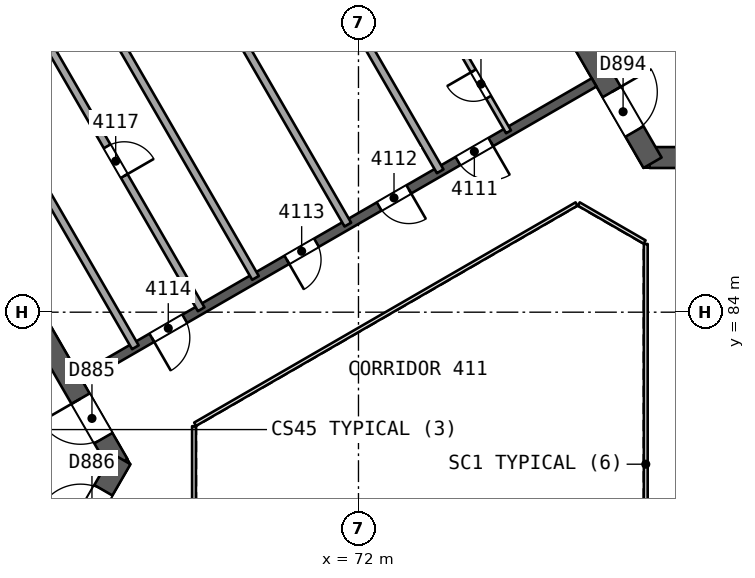
"""IFC4 building model, lengths in metres.
Left out: names, types, materials, properties, quantities, classifications, styles, units other than length and angle.
Written with IfcOpenShell. Run it as: python <this file> out.ifc"""

import sys

from ifc_helpers import new_model, si_unit, direction, frame, frame_2d, origin, place, context, subcontext, project, spatial, rectangle, extrude, element, fill, save


model = new_model("IFC4")
c1 = context("Model", 3, precision=1e-05, world=origin(), true_north=direction((0.0, 1.0)))
c2 = subcontext(c1, "Body", "Model", "MODEL_VIEW")
j1 = project(units=[si_unit("LENGTHUNIT", "METRE"), si_unit("PLANEANGLEUNIT", "RADIAN")], contexts=[c1])
p1 = place(None, origin())
s1 = spatial("IfcSite", under=j1, at=p1, CompositionType="ELEMENT")
p2 = place(p1, origin())
s2 = spatial("IfcBuilding", under=s1, at=p2, CompositionType="ELEMENT")
p3 = place(p2, frame((0.0, 0.0, 171.1)))
s3 = spatial("IfcBuildingStorey", under=s2, at=p3, CompositionType="ELEMENT", Elevation=171.1)
p4 = place(p3, frame((65.682, 80.0, 0.0), z_axis=(0.0, 0.0, 1.0), x_axis=(-0.500000202252, 0.866025287014, 0.0)))
e1 = element("IfcWall", 1, at=p4, inside=s3, PredefinedType="SHEAR", context=c2, shape_type="SweptSolid", body=[
    extrude(rectangle(XDim=10.221, YDim=0.55, at=frame_2d((5.111, 0.0))), origin(), (0.0, 0.0, 1.0), 3.7),
])
p5 = place(p4, frame((0.791, 0.0, 0.0)))
e2 = element("IfcOpeningElement", 2, at=p5, cuts=e1, PredefinedType="OPENING", context=c2, shape_type="SweptSolid", body=[
    extrude(rectangle(XDim=1.2, YDim=2.1, at=frame_2d((0.6, 1.05))), frame((0.0, 0.286, 0.0), z_axis=(0.0, -1.0, 0.0), x_axis=(1.0, 0.0, 0.0)), (0.0, 0.0, 1.0), 0.571),
])
p6 = place(p3, frame((60.709, 71.386, 0.0), z_axis=(0.0, 0.0, 1.0), x_axis=(0.500015938302, 0.866016201606, 0.0)))
e3 = element("IfcWall", 3, at=p6, inside=s3, PredefinedType="SHEAR", context=c2, shape_type="SweptSolid", body=[
    extrude(rectangle(XDim=10.105, YDim=0.55, at=frame_2d((5.053, 0.0))), origin(), (0.0, 0.0, 1.0), 3.7),
])
p7 = place(p6, frame((7.955, 0.0, 0.0)))
e4 = element("IfcOpeningElement", 4, at=p7, cuts=e3, PredefinedType="OPENING", context=c2, shape_type="SweptSolid", body=[
    extrude(rectangle(XDim=1.2, YDim=2.1, at=frame_2d((0.6, 1.05))), frame((0.0, 0.286, 0.0), z_axis=(0.0, -1.0, 0.0), x_axis=(1.0, 0.0, 0.0)), (0.0, 0.0, 1.0), 0.571),
])
p8 = place(p3, frame((79.659, 88.069, 0.0), z_axis=(0.0, 0.0, 1.0), x_axis=(1.0, 0.0, 0.0)))
e5 = element("IfcWall", 5, at=p8, inside=s3, PredefinedType="SHEAR", context=c2, shape_type="SweptSolid", body=[
    extrude(rectangle(XDim=10.221, YDim=0.55, at=frame_2d((5.111, 0.0))), origin(), (0.0, 0.0, 1.0), 3.7),
])
p9 = place(p8, frame((0.791, 0.0, 0.0)))
e6 = element("IfcOpeningElement", 6, at=p9, cuts=e5, PredefinedType="OPENING", context=c2, shape_type="SweptSolid", body=[
    extrude(rectangle(XDim=1.2, YDim=2.1, at=frame_2d((0.6, 1.05))), frame((0.0, 0.286, 0.0), z_axis=(0.0, -1.0, 0.0), x_axis=(1.0, 0.0, 0.0)), (0.0, 0.0, 1.0), 0.571),
])
p10 = place(p3, frame((74.686, 96.683, 0.0), z_axis=(0.0, 0.0, 1.0), x_axis=(0.499997818338, -0.866026663364, 0.0)))
e7 = element("IfcWall", 7, at=p10, inside=s3, PredefinedType="SHEAR", context=c2, shape_type="SweptSolid", body=[
    extrude(rectangle(XDim=10.105, YDim=0.55, at=frame_2d((5.052, 0.0))), origin(), (0.0, 0.0, 1.0), 3.7),
])
p11 = place(p10, frame((7.955, 0.0, 0.0)))
e8 = element("IfcOpeningElement", 8, at=p11, cuts=e7, PredefinedType="OPENING", context=c2, shape_type="SweptSolid", body=[
    extrude(rectangle(XDim=1.2, YDim=2.1, at=frame_2d((0.6, 1.05))), frame((0.0, 0.286, 0.0), z_axis=(0.0, -1.0, 0.0), x_axis=(1.0, 0.0, 0.0)), (0.0, 0.0, 1.0), 0.571),
])
p12 = place(p3, frame((78.2, 90.046, 0.0), z_axis=(0.0, 0.0, 1.0), x_axis=(-0.866026492143, -0.499998114903, 0.0)))
e9 = element("IfcWall", 9, at=p12, inside=s3, PredefinedType="SHEAR", context=c2, shape_type="SweptSolid", body=[
    extrude(rectangle(XDim=15.588, YDim=0.25, at=frame_2d((7.794, 0.0))), origin(), (0.0, 0.0, 1.0), 3.25),
])
p13 = place(p12, frame((3.138, 0.0, 0.0)))
e10 = element("IfcOpeningElement", 10, at=p13, cuts=e9, PredefinedType="OPENING", context=c2, shape_type="SweptSolid", body=[
    extrude(rectangle(XDim=1.0, YDim=2.1, at=frame_2d((0.5, 1.05))), frame((0.0, 0.135, 0.0), z_axis=(0.0, -1.0, 0.0), x_axis=(1.0, 0.0, 0.0)), (0.0, 0.0, 1.0), 0.271),
])
p14 = place(p12, frame((5.629, 0.0, 0.0)))
e11 = element("IfcOpeningElement", 11, at=p14, cuts=e9, PredefinedType="OPENING", context=c2, shape_type="SweptSolid", body=[
    extrude(rectangle(XDim=0.9, YDim=2.1, at=frame_2d((0.45, 1.05))), frame((0.0, 0.135, 0.0), z_axis=(0.0, -1.0, 0.0), x_axis=(1.0, 0.0, 0.0)), (0.0, 0.0, 1.0), 0.271),
])
p15 = place(p12, frame((8.435, 0.0, 0.0)))
e12 = element("IfcOpeningElement", 12, at=p15, cuts=e9, PredefinedType="OPENING", context=c2, shape_type="SweptSolid", body=[
    extrude(rectangle(XDim=0.9, YDim=2.1, at=frame_2d((0.45, 1.05))), frame((0.0, 0.135, 0.0), z_axis=(0.0, -1.0, 0.0), x_axis=(1.0, 0.0, 0.0)), (0.0, 0.0, 1.0), 0.271),
])
p16 = place(p12, frame((12.438, 0.0, 0.0)))
e13 = element("IfcOpeningElement", 13, at=p16, cuts=e9, PredefinedType="OPENING", context=c2, shape_type="SweptSolid", body=[
    extrude(rectangle(XDim=1.0, YDim=2.1, at=frame_2d((0.5, 1.05))), frame((0.0, 0.135, 0.0), z_axis=(0.0, -1.0, 0.0), x_axis=(1.0, 0.0, 0.0)), (0.0, 0.0, 1.0), 0.271),
])
p17 = place(p3, frame((75.948, 88.746, 0.0), z_axis=(0.0, 0.0, 1.0), x_axis=(-0.499987231761, 0.866032775405, 0.0)))
e14 = element("IfcWall", 14, at=p17, inside=s3, PredefinedType="PARTITIONING", context=c2, shape_type="SweptSolid", body=[
    extrude(rectangle(XDim=2.9, YDim=0.15, at=frame_2d((1.45, 0.0))), origin(), (0.0, 0.0, 1.0), 3.25),
])
p18 = place(p17, frame((1.05, 0.0, 0.0)))
e15 = element("IfcOpeningElement", 15, at=p18, cuts=e14, PredefinedType="OPENING", context=c2, shape_type="SweptSolid", body=[
    extrude(rectangle(XDim=0.8, YDim=2.1, at=frame_2d((0.4, 1.05))), frame((0.0, 0.085, 0.0), z_axis=(0.0, -1.0, 0.0), x_axis=(1.0, 0.0, 0.0)), (0.0, 0.0, 1.0), 0.171),
])
for number, where, z_axis, x_axis in (
    (16, (68.449, 97.582, 0.0), (0.0, 0.0, 1.0), (0.5, -0.866, 0.0)),
    (17, (66.019, 96.179, 0.0), (0.0, 0.0, 1.0), (0.5, -0.866, 0.0)),
    (18, (63.589, 94.776, 0.0), (0.0, 0.0, 1.0), (0.5, -0.866, 0.0)),
):
    element("IfcWall", number, at=place(p3, frame(where, z_axis=z_axis, x_axis=x_axis)), inside=s3, PredefinedType="PARTITIONING", context=c2, shape_type="SweptSolid", body=[
        extrude(rectangle(XDim=11.402, YDim=0.2, at=frame_2d((5.701, 0.0))), origin(), (0.0, 0.0, 1.0), 3.25),
    ])
p19 = place(p3, frame((66.129, 83.077, 0.0), z_axis=(0.0, 0.0, 1.0), x_axis=(-0.5000018851, 0.866024315419, 0.0)))
e19 = element("IfcWall", 19, at=p19, inside=s3, PredefinedType="PARTITIONING", context=c2, shape_type="SweptSolid", body=[
    extrude(rectangle(XDim=9.0, YDim=0.2, at=frame_2d((4.5, 0.0))), origin(), (0.0, 0.0, 1.0), 3.25),
])
p20 = place(p3, frame((63.361, 91.871, 0.0), z_axis=(0.0, 0.0, 1.0), x_axis=(0.5000018851, -0.866024315419, 0.0)))
e20 = element("IfcWall", 20, at=p20, inside=s3, PredefinedType="PARTITIONING", context=c2, shape_type="SweptSolid", body=[
    extrude(rectangle(XDim=9.0, YDim=0.2, at=frame_2d((4.5, 0.0))), origin(), (0.0, 0.0, 1.0), 3.25),
])
p21 = place(p20, frame((4.05, 0.0, 0.0)))
e21 = element("IfcOpeningElement", 21, at=p21, cuts=e20, PredefinedType="OPENING", context=c2, shape_type="SweptSolid", body=[
    extrude(rectangle(XDim=0.9, YDim=2.1, at=frame_2d((0.45, 1.05))), frame((0.0, 0.11, 0.0), z_axis=(0.0, -1.0, 0.0), x_axis=(1.0, 0.0, 0.0)), (0.0, 0.0, 1.0), 0.221),
])
p22 = place(p3, frame((42.45, 82.744, 0.0), z_axis=(0.0, 0.0, 1.0), x_axis=(0.866024128163, 0.500002209434, 0.0)))
e22 = element("IfcWall", 22, at=p22, inside=s3, PredefinedType="SOLIDWALL", context=c2, shape_type="SweptSolid", body=[
    extrude(rectangle(XDim=53.635, YDim=0.3, at=frame_2d((26.817, 0.0))), origin(), (0.0, 0.0, 1.0), 3.25),
])
p23 = place(p22, frame((20.473, 0.0, 0.0)))
e23 = element("IfcOpeningElement", 23, at=p23, cuts=e22, PredefinedType="OPENING", context=c2, shape_type="SweptSolid", body=[
    extrude(rectangle(XDim=2.4, YDim=2.4, at=frame_2d((1.2, 1.2))), frame((0.0, 0.161, 0.0), z_axis=(0.0, -1.0, 0.0), x_axis=(1.0, 0.0, 0.0)), (0.0, 0.0, 1.0), 0.321),
])
p24 = place(p22, frame((9.514, 0.0, 0.0)))
e24 = element("IfcOpeningElement", 24, at=p24, cuts=e22, PredefinedType="OPENING", context=c2, shape_type="SweptSolid", body=[
    extrude(rectangle(XDim=2.4, YDim=2.4, at=frame_2d((1.2, 1.2))), frame((0.0, 0.161, 0.0), z_axis=(0.0, -1.0, 0.0), x_axis=(1.0, 0.0, 0.0)), (0.0, 0.0, 1.0), 0.321),
])
p25 = place(p22, frame((40.628, 0.0, 0.0)))
e25 = element("IfcOpeningElement", 25, at=p25, cuts=e22, PredefinedType="OPENING", context=c2, shape_type="SweptSolid", body=[
    extrude(rectangle(XDim=2.4, YDim=2.4, at=frame_2d((1.2, 1.2))), frame((0.0, 0.161, 0.0), z_axis=(0.0, -1.0, 0.0), x_axis=(1.0, 0.0, 0.0)), (0.0, 0.0, 1.0), 0.321),
])
p26 = place(p22, frame((27.632, 0.0, 0.9)))
e26 = element("IfcOpeningElement", 26, at=p26, cuts=e22, PredefinedType="OPENING", context=c2, shape_type="SweptSolid", body=[
    extrude(rectangle(XDim=1.8, YDim=1.5, at=frame_2d((0.9, 0.75))), frame((0.0, 0.161, 0.0), z_axis=(0.0, -1.0, 0.0), x_axis=(1.0, 0.0, 0.0)), (0.0, 0.0, 1.0), 0.321),
])
p27 = place(p22, frame((24.826, 0.0, 0.9)))
e27 = element("IfcOpeningElement", 27, at=p27, cuts=e22, PredefinedType="OPENING", context=c2, shape_type="SweptSolid", body=[
    extrude(rectangle(XDim=1.8, YDim=1.5, at=frame_2d((0.9, 0.75))), frame((0.0, 0.161, 0.0), z_axis=(0.0, -1.0, 0.0), x_axis=(1.0, 0.0, 0.0)), (0.0, 0.0, 1.0), 0.321),
])
p28 = place(p3, frame((86.77, 89.486, 0.0), z_axis=(0.0, 0.0, 1.0), x_axis=(-0.86601811187, 0.500012629753, 0.0)))
e28 = element("IfcWall", 28, at=p28, inside=s3, PredefinedType="SOLIDWALL", context=c2, shape_type="SweptSolid", body=[
    extrude(rectangle(XDim=10.9, YDim=0.2, at=frame_2d((5.45, 0.0))), origin(), (0.0, 0.0, 1.0), 3.25),
])
p29 = place(p28, frame((0.575, 0.0, 0.0)))
e29 = element("IfcOpeningElement", 29, at=p29, cuts=e28, PredefinedType="OPENING", context=c2, shape_type="SweptSolid", body=[
    extrude(rectangle(XDim=1.1, YDim=2.1, at=frame_2d((0.55, 1.05))), frame((0.0, 0.11, 0.0), z_axis=(0.0, -1.0, 0.0), x_axis=(1.0, 0.0, 0.0)), (0.0, 0.0, 1.0), 0.221),
])
p30 = place(p28, frame((2.825, 0.0, 0.0)))
e30 = element("IfcOpeningElement", 30, at=p30, cuts=e28, PredefinedType="OPENING", context=c2, shape_type="SweptSolid", body=[
    extrude(rectangle(XDim=1.1, YDim=2.1, at=frame_2d((0.55, 1.05))), frame((0.0, 0.11, 0.0), z_axis=(0.0, -1.0, 0.0), x_axis=(1.0, 0.0, 0.0)), (0.0, 0.0, 1.0), 0.221),
])
p31 = place(p28, frame((5.075, 0.0, 0.0)))
e31 = element("IfcOpeningElement", 31, at=p31, cuts=e28, PredefinedType="OPENING", context=c2, shape_type="SweptSolid", body=[
    extrude(rectangle(XDim=1.1, YDim=2.1, at=frame_2d((0.55, 1.05))), frame((0.0, 0.11, 0.0), z_axis=(0.0, -1.0, 0.0), x_axis=(1.0, 0.0, 0.0)), (0.0, 0.0, 1.0), 0.221),
])
p32 = place(p28, frame((7.325, 0.0, 0.0)))
e32 = element("IfcOpeningElement", 32, at=p32, cuts=e28, PredefinedType="OPENING", context=c2, shape_type="SweptSolid", body=[
    extrude(rectangle(XDim=1.1, YDim=2.1, at=frame_2d((0.55, 1.05))), frame((0.0, 0.11, 0.0), z_axis=(0.0, -1.0, 0.0), x_axis=(1.0, 0.0, 0.0)), (0.0, 0.0, 1.0), 0.221),
])
p33 = place(p3, frame((89.33, 90.872, 0.0), z_axis=(0.0, 0.0, 1.0), x_axis=(-0.866027589512, 0.49999621419, 0.0)))
e33 = element("IfcWall", 33, at=p33, inside=s3, PredefinedType="SOLIDWALL", context=c2, shape_type="SweptSolid", body=[
    extrude(rectangle(XDim=10.524, YDim=0.2, at=frame_2d((5.262, 0.0))), origin(), (0.0, 0.0, 1.0), 3.25),
])
p34 = place(p33, frame((0.312, 0.0, 0.0)))
e34 = element("IfcOpeningElement", 34, at=p34, cuts=e33, PredefinedType="OPENING", context=c2, shape_type="SweptSolid", body=[
    extrude(rectangle(XDim=0.9, YDim=2.1, at=frame_2d((0.45, 1.05))), frame((0.0, 0.11, 0.0), z_axis=(0.0, -1.0, 0.0), x_axis=(1.0, 0.0, 0.0)), (0.0, 0.0, 1.0), 0.221),
])
p35 = place(p3, frame((79.56, 74.206, 0.0), z_axis=(0.0, 0.0, 1.0), x_axis=(0.0, 1.0, 0.0)))
e35 = element("IfcWall", 35, at=p35, inside=s3, PredefinedType="PARTITIONING", context=c2, shape_type="SweptSolid", body=[
    extrude(rectangle(XDim=11.588, YDim=0.1, at=frame_2d((5.794, 0.0))), origin(), (0.0, 0.0, 1.0), 3.25),
])
p36 = place(p3, frame((79.53, 85.846, 0.0), z_axis=(0.0, 0.0, 1.0), x_axis=(-0.866041268327, 0.499972520799, 0.0)))
e36 = element("IfcWall", 36, at=p36, inside=s3, PredefinedType="PARTITIONING", context=c2, shape_type="SweptSolid", body=[
    extrude(rectangle(XDim=2.0, YDim=0.1, at=frame_2d((1.0, 0.0))), origin(), (0.0, 0.0, 1.0), 3.25),
])
p37 = place(p3, frame((77.738, 86.846, 0.0), z_axis=(0.0, 0.0, 1.0), x_axis=(-0.866026658274, -0.499997827154, 0.0)))
e37 = element("IfcWall", 37, at=p37, inside=s3, PredefinedType="PARTITIONING", context=c2, shape_type="SweptSolid", body=[
    extrude(rectangle(XDim=11.588, YDim=0.1, at=frame_2d((5.794, 0.0))), origin(), (0.0, 0.0, 1.0), 3.25),
])
p38 = place(p3, frame((67.672, 81.0, 0.0), z_axis=(0.0, 0.0, 1.0), x_axis=(0.0, -1.0, 0.0)))
e38 = element("IfcWall", 38, at=p38, inside=s3, PredefinedType="PARTITIONING", context=c2, shape_type="SweptSolid", body=[
    extrude(rectangle(XDim=2.0, YDim=0.1, at=frame_2d((1.0, 0.0))), origin(), (0.0, 0.0, 1.0), 3.25),
])
p39 = place(p18, origin())
e39 = element("IfcDoor", 39, at=p39, inside=s3, OperationType="SINGLE_SWING_RIGHT", PredefinedType="NOTDEFINED", context=c2, shape_type="SweptSolid", body=[
    extrude(rectangle(XDim=0.8, YDim=2.1, at=frame_2d((0.4, 1.05))), frame((0.0, 0.025, 0.0), z_axis=(0.0, -1.0, 0.0), x_axis=(1.0, 0.0, 0.0)), (0.0, 0.0, 1.0), 0.05),
])
fill(e15, e39)
p40 = place(p13, origin())
e40 = element("IfcDoor", 40, at=p40, inside=s3, OperationType="SINGLE_SWING_LEFT", PredefinedType="NOTDEFINED", context=c2, shape_type="SweptSolid", body=[
    extrude(rectangle(XDim=1.0, YDim=2.1, at=frame_2d((0.5, 1.05))), frame((0.0, 0.025, 0.0), z_axis=(0.0, -1.0, 0.0), x_axis=(1.0, 0.0, 0.0)), (0.0, 0.0, 1.0), 0.05),
])
fill(e10, e40)
p41 = place(p14, origin())
e41 = element("IfcDoor", 41, at=p41, inside=s3, OperationType="SINGLE_SWING_LEFT", PredefinedType="NOTDEFINED", context=c2, shape_type="SweptSolid", body=[
    extrude(rectangle(XDim=0.9, YDim=2.1, at=frame_2d((0.45, 1.05))), frame((0.0, 0.025, 0.0), z_axis=(0.0, -1.0, 0.0), x_axis=(1.0, 0.0, 0.0)), (0.0, 0.0, 1.0), 0.05),
])
fill(e11, e41)
p42 = place(p15, origin())
e42 = element("IfcDoor", 42, at=p42, inside=s3, OperationType="SINGLE_SWING_RIGHT", PredefinedType="NOTDEFINED", context=c2, shape_type="SweptSolid", body=[
    extrude(rectangle(XDim=0.9, YDim=2.1, at=frame_2d((0.45, 1.05))), frame((0.0, 0.025, 0.0), z_axis=(0.0, -1.0, 0.0), x_axis=(1.0, 0.0, 0.0)), (0.0, 0.0, 1.0), 0.05),
])
fill(e12, e42)
p43 = place(p16, origin())
e43 = element("IfcDoor", 43, at=p43, inside=s3, OperationType="SINGLE_SWING_RIGHT", PredefinedType="NOTDEFINED", context=c2, shape_type="SweptSolid", body=[
    extrude(rectangle(XDim=1.0, YDim=2.1, at=frame_2d((0.5, 1.05))), frame((0.0, 0.025, 0.0), z_axis=(0.0, -1.0, 0.0), x_axis=(1.0, 0.0, 0.0)), (0.0, 0.0, 1.0), 0.05),
])
fill(e13, e43)
p44 = place(p21, origin())
e44 = element("IfcDoor", 44, at=p44, inside=s3, OperationType="SINGLE_SWING_RIGHT", PredefinedType="NOTDEFINED", context=c2, shape_type="SweptSolid", body=[
    extrude(rectangle(XDim=0.9, YDim=2.1, at=frame_2d((0.45, 1.05))), frame((0.0, 0.025, 0.0), z_axis=(0.0, -1.0, 0.0), x_axis=(1.0, 0.0, 0.0)), (0.0, 0.0, 1.0), 0.05),
])
fill(e21, e44)
p45 = place(p5, origin())
e45 = element("IfcDoor", 45, at=p45, inside=s3, OperationType="SINGLE_SWING_RIGHT", PredefinedType="NOTDEFINED", context=c2, shape_type="SweptSolid", body=[
    extrude(rectangle(XDim=1.2, YDim=2.1, at=frame_2d((0.6, 1.05))), frame((0.0, 0.025, 0.0), z_axis=(0.0, -1.0, 0.0), x_axis=(1.0, 0.0, 0.0)), (0.0, 0.0, 1.0), 0.05),
])
fill(e2, e45)
p46 = place(p7, origin())
e46 = element("IfcDoor", 46, at=p46, inside=s3, OperationType="SINGLE_SWING_LEFT", PredefinedType="NOTDEFINED", context=c2, shape_type="SweptSolid", body=[
    extrude(rectangle(XDim=1.2, YDim=2.1, at=frame_2d((0.6, 1.05))), frame((0.0, 0.025, 0.0), z_axis=(0.0, -1.0, 0.0), x_axis=(1.0, 0.0, 0.0)), (0.0, 0.0, 1.0), 0.05),
])
fill(e4, e46)
p47 = place(p11, origin())
e47 = element("IfcDoor", 47, at=p47, inside=s3, OperationType="SINGLE_SWING_LEFT", PredefinedType="NOTDEFINED", context=c2, shape_type="SweptSolid", body=[
    extrude(rectangle(XDim=1.2, YDim=2.1, at=frame_2d((0.6, 1.05))), frame((0.0, 0.025, 0.0), z_axis=(0.0, -1.0, 0.0), x_axis=(1.0, 0.0, 0.0)), (0.0, 0.0, 1.0), 0.05),
])
fill(e8, e47)
save(model, sys.argv[1])
